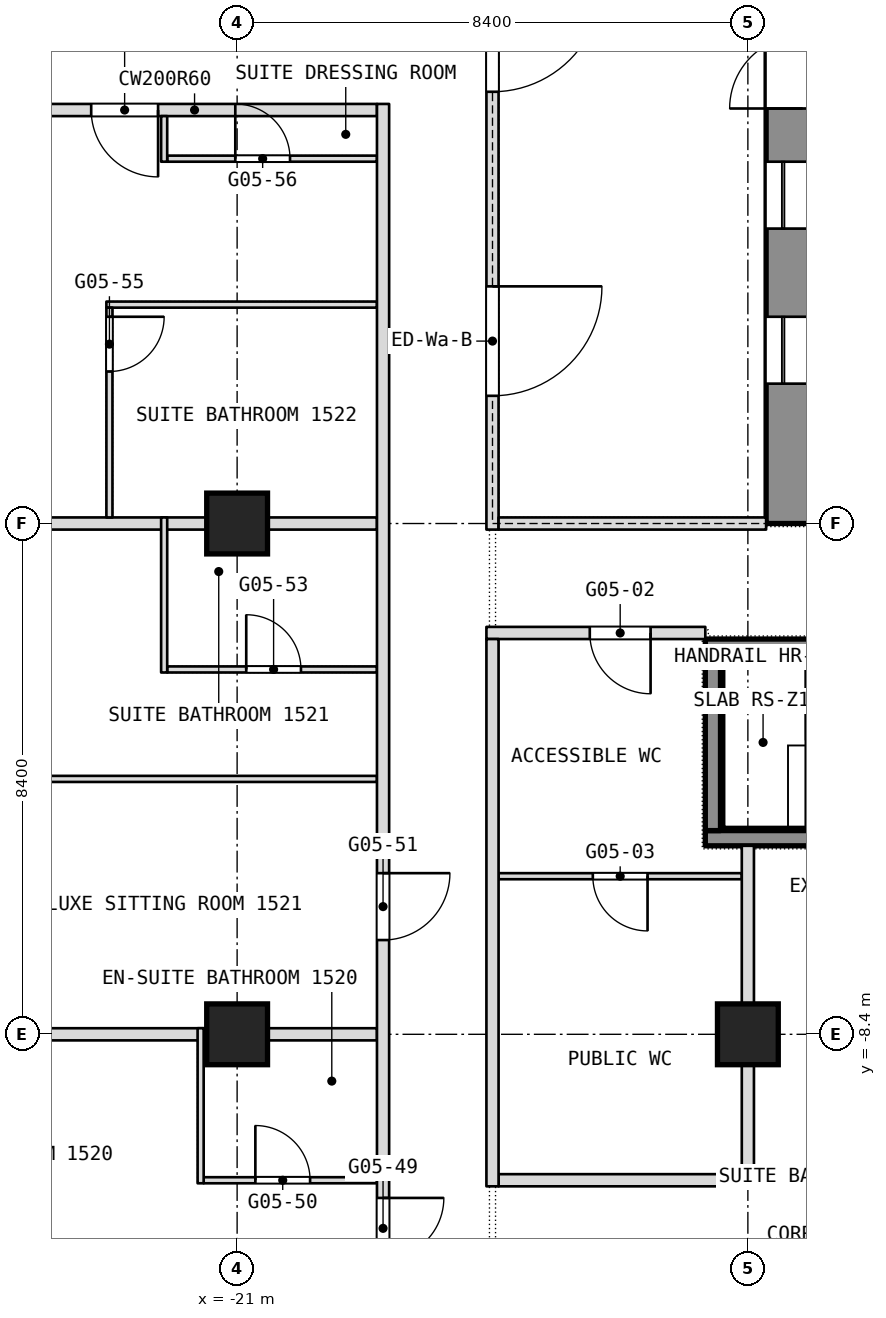
"""IFC4 building model, lengths in metres.
Left out: names, types, materials, properties, quantities, classifications, styles, units other than length and angle.
Written with IfcOpenShell. Run it as: python <this file> out.ifc"""

import sys

from ifc_helpers import new_model, si_unit, direction, frame, frame_2d, origin, origin_2d, place, context, subcontext, project, spatial, rectangle, extrude, element, fill, save


model = new_model("IFC4")
c1 = context("Model", 3, precision=1e-05, world=origin(), true_north=direction((0.0, 1.0)))
c2 = subcontext(c1, "Body", "Model", "MODEL_VIEW")
j1 = project(units=[si_unit("LENGTHUNIT", "METRE"), si_unit("PLANEANGLEUNIT", "RADIAN")], contexts=[c1])
p1 = place(None, origin())
s1 = spatial("IfcSite", under=j1, at=p1, CompositionType="ELEMENT")
p2 = place(p1, origin())
s2 = spatial("IfcBuilding", under=s1, at=p2, CompositionType="ELEMENT")
p3 = place(p2, frame((0.0, 0.0, 68.9)))
s3 = spatial("IfcBuildingStorey", under=s2, at=p3, CompositionType="ELEMENT", Elevation=68.9)
p4 = place(p3, frame((-11.7, 0.0, 0.0), z_axis=(0.0, 0.0, 1.0), x_axis=(0.0, 1.0, 0.0)))
e1 = element("IfcWall", 1, at=p4, inside=s3, PredefinedType="SHEAR", context=c2, shape_type="SweptSolid", body=[
    extrude(rectangle(XDim=16.8, YDim=1.2, at=frame_2d((8.4, 0.0))), origin(), (0.0, 0.0, 1.0), 3.6),
])
p5 = place(p4, frame((2.3, 0.0, 0.0)))
e2 = element("IfcOpeningElement", 2, at=p5, cuts=e1, PredefinedType="OPENING", context=c2, shape_type="SweptSolid", body=[
    extrude(rectangle(XDim=1.1, YDim=2.1, at=frame_2d((0.55, 1.05))), frame((0.0, 0.6, 0.0), z_axis=(0.0, -1.0, 0.0), x_axis=(1.0, 0.0, 0.0)), (0.0, 0.0, 1.0), 1.2),
])
p6 = place(p4, frame((4.85, 0.0, 0.0)))
e3 = element("IfcOpeningElement", 3, at=p6, cuts=e1, PredefinedType="OPENING", context=c2, shape_type="SweptSolid", body=[
    extrude(rectangle(XDim=1.1, YDim=2.1, at=frame_2d((0.55, 1.05))), frame((0.0, 0.6, 0.0), z_axis=(0.0, -1.0, 0.0), x_axis=(1.0, 0.0, 0.0)), (0.0, 0.0, 1.0), 1.2),
])
p7 = place(p4, frame((6.825, 0.0, 0.0)))
e4 = element("IfcOpeningElement", 4, at=p7, cuts=e1, PredefinedType="OPENING", context=c2, shape_type="SweptSolid", body=[
    extrude(rectangle(XDim=1.2, YDim=2.1, at=frame_2d((0.6, 1.05))), frame((0.0, 0.6, 0.0), z_axis=(0.0, -1.0, 0.0), x_axis=(1.0, 0.0, 0.0)), (0.0, 0.0, 1.0), 1.2),
])
p8 = place(p4, frame((13.4, 0.0, 0.0)))
e5 = element("IfcOpeningElement", 5, at=p8, cuts=e1, PredefinedType="OPENING", context=c2, shape_type="SweptSolid", body=[
    extrude(rectangle(XDim=1.1, YDim=2.1, at=frame_2d((0.55, 1.05))), frame((0.0, 0.6, 0.0), z_axis=(0.0, -1.0, 0.0), x_axis=(1.0, 0.0, 0.0)), (0.0, 0.0, 1.0), 1.2),
])
p9 = place(p4, frame((10.85, 0.0, 0.0)))
e6 = element("IfcOpeningElement", 6, at=p9, cuts=e1, PredefinedType="OPENING", context=c2, shape_type="SweptSolid", body=[
    extrude(rectangle(XDim=1.1, YDim=2.1, at=frame_2d((0.55, 1.05))), frame((0.0, 0.6, 0.0), z_axis=(0.0, -1.0, 0.0), x_axis=(1.0, 0.0, 0.0)), (0.0, 0.0, 1.0), 1.2),
])
p10 = place(p4, frame((8.775, 0.0, 0.0)))
e7 = element("IfcOpeningElement", 7, at=p10, cuts=e1, PredefinedType="OPENING", context=c2, shape_type="SweptSolid", body=[
    extrude(rectangle(XDim=1.2, YDim=2.1, at=frame_2d((0.6, 1.05))), frame((0.0, 0.6, 0.0), z_axis=(0.0, -1.0, 0.0), x_axis=(1.0, 0.0, 0.0)), (0.0, 0.0, 1.0), 1.2),
])
for number, where, z_axis, x_axis in (
    (8, (-21.0, -8.4, 0.0), (0.0, 0.0, 1.0), (1.0, 0.0, 0.0)),
    (9, (-21.0, 0.0, 0.0), (0.0, 0.0, 1.0), (1.0, 0.0, 0.0)),
    (10, (-12.6, -8.4, 0.0), (0.0, 0.0, 1.0), (1.0, 0.0, 0.0)),
):
    element("IfcColumn", number, at=place(p3, frame(where, z_axis=z_axis, x_axis=x_axis)), inside=s3, PredefinedType="COLUMN", context=c2, shape_type="SweptSolid", body=[
        extrude(rectangle(XDim=1.0, YDim=1.0, at=origin_2d()), origin(), (0.0, 0.0, 1.0), 3.6),
    ])
p11 = place(p3, frame((-21.55, -10.8, 0.0), z_axis=(0.0, 0.0, 1.0), x_axis=(1.0, 0.0, 0.0)))
e11 = element("IfcWall", 11, at=p11, inside=s3, PredefinedType="PARTITIONING", context=c2, shape_type="SweptSolid", body=[
    extrude(rectangle(XDim=2.85, YDim=0.1, at=frame_2d((1.425, 0.0))), origin(), (0.0, 0.0, 1.0), 3.34),
])
p12 = place(p11, frame((0.85, 0.0, 0.0)))
e12 = element("IfcOpeningElement", 12, at=p12, cuts=e11, PredefinedType="OPENING", context=c2, shape_type="SweptSolid", body=[
    extrude(rectangle(XDim=0.9, YDim=2.1, at=frame_2d((0.45, 1.05))), frame((0.0, 0.05, 0.0), z_axis=(0.0, -1.0, 0.0), x_axis=(1.0, 0.0, 0.0)), (0.0, 0.0, 1.0), 0.1),
])
p13 = place(p3, frame((-16.7, -10.8, 0.0), z_axis=(0.0, 0.0, 1.0), x_axis=(1.0, 0.0, 0.0)))
e13 = element("IfcWall", 13, at=p13, inside=s3, PredefinedType="PARTITIONING", context=c2, shape_type="SweptSolid", body=[
    extrude(rectangle(XDim=4.0, YDim=0.2, at=frame_2d((2.0, 0.0))), origin(), (0.0, 0.0, 1.0), 3.34),
])
p14 = place(p3, frame((-29.7, -8.4, 0.0), z_axis=(0.0, 0.0, 1.0), x_axis=(1.0, 0.0, 0.0)))
e14 = element("IfcWall", 14, at=p14, inside=s3, PredefinedType="PARTITIONING", context=c2, shape_type="SweptSolid", body=[
    extrude(rectangle(XDim=11.0, YDim=0.2, at=frame_2d((5.5, 0.0))), origin(), (0.0, 0.0, 1.0), 2.84),
])
p15 = place(p3, frame((-16.7, -5.8, 0.0), z_axis=(0.0, 0.0, 1.0), x_axis=(1.0, 0.0, 0.0)))
e15 = element("IfcWall", 15, at=p15, inside=s3, PredefinedType="PARTITIONING", context=c2, shape_type="SweptSolid", body=[
    extrude(rectangle(XDim=4.0, YDim=0.1, at=frame_2d((2.0, 0.0))), origin(), (0.0, 0.0, 1.0), 3.34),
])
p16 = place(p15, frame((1.55, 0.0, 0.0)))
e16 = element("IfcOpeningElement", 16, at=p16, cuts=e15, PredefinedType="OPENING", context=c2, shape_type="SweptSolid", body=[
    extrude(rectangle(XDim=0.9, YDim=2.1, at=frame_2d((0.45, 1.05))), frame((0.0, 0.05, 0.0), z_axis=(0.0, -1.0, 0.0), x_axis=(1.0, 0.0, 0.0)), (0.0, 0.0, 1.0), 0.1),
])
p17 = place(p3, frame((-29.7, -4.2, 0.0), z_axis=(0.0, 0.0, 1.0), x_axis=(1.0, 0.0, 0.0)))
e17 = element("IfcWall", 17, at=p17, inside=s3, PredefinedType="PARTITIONING", context=c2, shape_type="SweptSolid", body=[
    extrude(rectangle(XDim=11.0, YDim=0.1, at=frame_2d((5.5, 0.0))), origin(), (0.0, 0.0, 1.0), 3.34),
])
p18 = place(p17, frame((4.17, 0.0, 0.0)))
e18 = element("IfcOpeningElement", 18, at=p18, cuts=e17, PredefinedType="OPENING", context=c2, shape_type="SweptSolid", body=[
    extrude(rectangle(XDim=0.9, YDim=2.1, at=frame_2d((0.45, 1.05))), frame((0.0, 0.05, 0.0), z_axis=(0.0, -1.0, 0.0), x_axis=(1.0, 0.0, 0.0)), (0.0, 0.0, 1.0), 0.1),
])
p19 = place(p3, frame((-22.15, -2.4, 0.0), z_axis=(0.0, 0.0, 1.0), x_axis=(1.0, 0.0, 0.0)))
e19 = element("IfcWall", 19, at=p19, inside=s3, PredefinedType="PARTITIONING", context=c2, shape_type="SweptSolid", body=[
    extrude(rectangle(XDim=3.45, YDim=0.1, at=frame_2d((1.725, 0.0))), origin(), (0.0, 0.0, 1.0), 3.34),
])
p20 = place(p19, frame((1.3, 0.0, 0.0)))
e20 = element("IfcOpeningElement", 20, at=p20, cuts=e19, PredefinedType="OPENING", context=c2, shape_type="SweptSolid", body=[
    extrude(rectangle(XDim=0.9, YDim=2.1, at=frame_2d((0.45, 1.05))), frame((0.0, 0.05, 0.0), z_axis=(0.0, -1.0, 0.0), x_axis=(1.0, 0.0, 0.0)), (0.0, 0.0, 1.0), 0.1),
])
p21 = place(p3, frame((-16.9, -1.8, 0.0), z_axis=(0.0, 0.0, 1.0), x_axis=(1.0, 0.0, 0.0)))
e21 = element("IfcWall", 21, at=p21, inside=s3, PredefinedType="PARTITIONING", context=c2, shape_type="SweptSolid", body=[
    extrude(rectangle(XDim=3.6, YDim=0.2, at=frame_2d((1.8, 0.0))), origin(), (0.0, 0.0, 1.0), 3.34),
])
p22 = place(p21, frame((1.7, 0.0, 0.0)))
e22 = element("IfcOpeningElement", 22, at=p22, cuts=e21, PredefinedType="OPENING", context=c2, shape_type="SweptSolid", body=[
    extrude(rectangle(XDim=1.0, YDim=2.1, at=frame_2d((0.5, 1.05))), frame((0.0, 0.1, 0.0), z_axis=(0.0, -1.0, 0.0), x_axis=(1.0, 0.0, 0.0)), (0.0, 0.0, 1.0), 0.2),
])
p23 = place(p3, frame((-29.7, 0.0, 0.0), z_axis=(0.0, 0.0, 1.0), x_axis=(1.0, 0.0, 0.0)))
e23 = element("IfcWall", 23, at=p23, inside=s3, PredefinedType="PARTITIONING", context=c2, shape_type="SweptSolid", body=[
    extrude(rectangle(XDim=11.0, YDim=0.2, at=frame_2d((5.5, 0.0))), origin(), (0.0, 0.0, 1.0), 2.84),
])
p24 = place(p3, frame((-23.15, 3.6, 0.0), z_axis=(0.0, 0.0, 1.0), x_axis=(1.0, 0.0, 0.0)))
e24 = element("IfcWall", 24, at=p24, inside=s3, PredefinedType="PARTITIONING", context=c2, shape_type="SweptSolid", body=[
    extrude(rectangle(XDim=4.45, YDim=0.1, at=frame_2d((2.225, 0.0))), origin(), (0.0, 0.0, 1.0), 3.34),
])
p25 = place(p3, frame((-22.15, 6.0, 0.0), z_axis=(0.0, 0.0, 1.0), x_axis=(1.0, 0.0, 0.0)))
e25 = element("IfcWall", 25, at=p25, inside=s3, PredefinedType="PARTITIONING", context=c2, shape_type="SweptSolid", body=[
    extrude(rectangle(XDim=3.45, YDim=0.1, at=frame_2d((1.725, 0.0))), origin(), (0.0, 0.0, 1.0), 3.34),
])
p26 = place(p25, frame((1.12, 0.0, 0.0)))
e26 = element("IfcOpeningElement", 26, at=p26, cuts=e25, PredefinedType="OPENING", context=c2, shape_type="SweptSolid", body=[
    extrude(rectangle(XDim=0.9, YDim=2.1, at=frame_2d((0.45, 1.05))), frame((0.0, 0.05, 0.0), z_axis=(0.0, -1.0, 0.0), x_axis=(1.0, 0.0, 0.0)), (0.0, 0.0, 1.0), 0.1),
])
p27 = place(p3, frame((-24.7, 6.8, 0.0), z_axis=(0.0, 0.0, 1.0), x_axis=(1.0, 0.0, 0.0)))
e27 = element("IfcWall", 27, at=p27, inside=s3, PredefinedType="PARTITIONING", context=c2, shape_type="SweptSolid", body=[
    extrude(rectangle(XDim=6.0, YDim=0.2, at=frame_2d((3.0, 0.0))), origin(), (0.0, 0.0, 1.0), 3.34),
])
p28 = place(p27, frame((1.3, 0.0, 0.0)))
e28 = element("IfcOpeningElement", 28, at=p28, cuts=e27, PredefinedType="OPENING", context=c2, shape_type="SweptSolid", body=[
    extrude(rectangle(XDim=1.1, YDim=2.1, at=frame_2d((0.55, 1.05))), frame((0.0, 0.1, 0.0), z_axis=(0.0, -1.0, 0.0), x_axis=(1.0, 0.0, 0.0)), (0.0, 0.0, 1.0), 0.2),
])
p29 = place(p3, frame((-12.6, -10.9, 0.0), z_axis=(0.0, 0.0, 1.0), x_axis=(0.0, 1.0, 0.0)))
e29 = element("IfcWall", 29, at=p29, inside=s3, PredefinedType="PARTITIONING", context=c2, shape_type="SweptSolid", body=[
    extrude(rectangle(XDim=5.6, YDim=0.2, at=frame_2d((2.8, 0.0))), origin(), (0.0, 0.0, 1.0), 3.34),
])
p30 = place(p3, frame((-16.8, -10.9, 0.0), z_axis=(0.0, 0.0, 1.0), x_axis=(0.0, 1.0, 0.0)))
e30 = element("IfcWall", 30, at=p30, inside=s3, PredefinedType="PARTITIONING", context=c2, shape_type="SweptSolid", body=[
    extrude(rectangle(XDim=9.0, YDim=0.2, at=frame_2d((4.5, 0.0))), origin(), (0.0, 0.0, 1.0), 3.34),
])
p31 = place(p3, frame((-18.6, -16.665, 0.0), z_axis=(0.0, 0.0, 1.0), x_axis=(0.0, 1.0, 0.0)))
e31 = element("IfcWall", 31, at=p31, inside=s3, PredefinedType="PARTITIONING", context=c2, shape_type="SweptSolid", body=[
    extrude(rectangle(XDim=23.565, YDim=0.2, at=frame_2d((11.782, 0.0))), origin(), (0.0, 0.0, 1.0), 3.34),
])
p32 = place(p31, frame((2.991, 0.0, 0.0)))
e32 = element("IfcOpeningElement", 32, at=p32, cuts=e31, PredefinedType="OPENING", context=c2, shape_type="SweptSolid", body=[
    extrude(rectangle(XDim=1.0, YDim=2.1, at=frame_2d((0.5, 1.05))), frame((0.0, 0.1, 0.0), z_axis=(0.0, -1.0, 0.0), x_axis=(1.0, 0.0, 0.0)), (0.0, 0.0, 1.0), 0.2),
])
p33 = place(p31, frame((4.574, 0.0, 0.0)))
e33 = element("IfcOpeningElement", 33, at=p33, cuts=e31, PredefinedType="OPENING", context=c2, shape_type="SweptSolid", body=[
    extrude(rectangle(XDim=1.0, YDim=2.1, at=frame_2d((0.5, 1.05))), frame((0.0, 0.1, 0.0), z_axis=(0.0, -1.0, 0.0), x_axis=(1.0, 0.0, 0.0)), (0.0, 0.0, 1.0), 0.2),
])
p34 = place(p31, frame((9.815, 0.0, 0.0)))
e34 = element("IfcOpeningElement", 34, at=p34, cuts=e31, PredefinedType="OPENING", context=c2, shape_type="SweptSolid", body=[
    extrude(rectangle(XDim=1.1, YDim=2.1, at=frame_2d((0.55, 1.05))), frame((0.0, 0.1, 0.0), z_axis=(0.0, -1.0, 0.0), x_axis=(1.0, 0.0, 0.0)), (0.0, 0.0, 1.0), 0.2),
])
for number, where, z_axis, x_axis in (
    (35, (-21.6, -10.85, 0.0), (0.0, 0.0, 1.0), (0.0, 1.0, 0.0)),
    (36, (-22.2, -2.45, 0.0), (0.0, 0.0, 1.0), (0.0, 1.0, 0.0)),
):
    element("IfcWall", number, at=place(p3, frame(where, z_axis=z_axis, x_axis=x_axis)), inside=s3, PredefinedType="PARTITIONING", context=c2, shape_type="SweptSolid", body=[
        extrude(rectangle(XDim=2.55, YDim=0.1, at=frame_2d((1.275, 0.0))), origin(), (0.0, 0.0, 1.0), 3.34),
    ])
p35 = place(p3, frame((-22.2, 5.95, 0.0), z_axis=(0.0, 0.0, 1.0), x_axis=(0.0, 1.0, 0.0)))
e37 = element("IfcWall", 37, at=p35, inside=s3, PredefinedType="PARTITIONING", context=c2, shape_type="SweptSolid", body=[
    extrude(rectangle(XDim=0.75, YDim=0.1, at=frame_2d((0.375, 0.0))), origin(), (0.0, 0.0, 1.0), 3.34),
])
p36 = place(p3, frame((-23.1, 0.1, 0.0), z_axis=(0.0, 0.0, 1.0), x_axis=(0.0, 1.0, 0.0)))
e38 = element("IfcWall", 38, at=p36, inside=s3, PredefinedType="PARTITIONING", context=c2, shape_type="SweptSolid", body=[
    extrude(rectangle(XDim=3.45, YDim=0.1, at=frame_2d((1.725, 0.0))), origin(), (0.0, 0.0, 1.0), 3.34),
])
p37 = place(p36, frame((2.4, 0.0, 0.0)))
e39 = element("IfcOpeningElement", 39, at=p37, cuts=e38, PredefinedType="OPENING", context=c2, shape_type="SweptSolid", body=[
    extrude(rectangle(XDim=0.9, YDim=2.1, at=frame_2d((0.45, 1.05))), frame((0.0, 0.05, 0.0), z_axis=(0.0, -1.0, 0.0), x_axis=(1.0, 0.0, 0.0)), (0.0, 0.0, 1.0), 0.1),
])
p38 = place(p3, frame((-16.8, -0.1, 0.0), z_axis=(0.0, 0.0, 1.0), x_axis=(0.0, 1.0, 0.0)))
e40 = element("IfcWall", 40, at=p38, inside=s3, PredefinedType="PARTITIONING", context=c2, shape_type="SweptSolid", body=[
    extrude(rectangle(XDim=17.0, YDim=0.2, at=frame_2d((8.5, 0.0))), origin(), (0.0, 0.0, 1.0), 3.34),
])
p39 = place(p38, frame((2.2, 0.0, 0.0)))
e41 = element("IfcOpeningElement", 41, at=p39, cuts=e40, PredefinedType="OPENING", context=c2, shape_type="SweptSolid", body=[
    extrude(rectangle(XDim=1.8, YDim=2.1, at=frame_2d((0.9, 1.05))), frame((0.0, 0.1, 0.0), z_axis=(0.0, -1.0, 0.0), x_axis=(1.0, 0.0, 0.0)), (0.0, 0.0, 1.0), 0.2),
])
p40 = place(p38, frame((7.2, 0.0, 0.0)))
e42 = element("IfcOpeningElement", 42, at=p40, cuts=e40, PredefinedType="OPENING", context=c2, shape_type="SweptSolid", body=[
    extrude(rectangle(XDim=1.8, YDim=2.1, at=frame_2d((0.9, 1.05))), frame((0.0, 0.1, 0.0), z_axis=(0.0, -1.0, 0.0), x_axis=(1.0, 0.0, 0.0)), (0.0, 0.0, 1.0), 0.2),
])
p41 = place(p3, frame((-16.7, 0.0, 0.0), z_axis=(0.0, 0.0, 1.0), x_axis=(1.0, 0.0, 0.0)))
e43 = element("IfcWall", 43, at=p41, inside=s3, PredefinedType="PARTITIONING", context=c2, shape_type="SweptSolid", body=[
    extrude(rectangle(XDim=4.4, YDim=0.2, at=frame_2d((2.2, 0.0))), origin(), (0.0, 0.0, 1.0), 2.84),
])
for number, where, z_axis, x_axis in (
    (44, (-13.3, -5.175, 0.1), (0.0, 0.0, 1.0), (1.0, 0.0, 0.0)),
    (45, (-13.3, -2.025, 0.1), (0.0, 0.0, 1.0), (1.0, 0.0, 0.0)),
):
    element("IfcWall", number, at=place(p3, frame(where, z_axis=z_axis, x_axis=x_axis)), inside=s3, PredefinedType="SHEAR", context=c2, shape_type="SweptSolid", body=[
        extrude(rectangle(XDim=6.2, YDim=0.25, at=frame_2d((3.1, 0.0))), origin(), (0.0, 0.0, 1.0), 3.6),
    ])
p42 = place(p3, frame((-13.175, -5.05, 0.1), z_axis=(0.0, 0.0, 1.0), x_axis=(0.0, 1.0, 0.0)))
e46 = element("IfcWall", 46, at=p42, inside=s3, PredefinedType="SHEAR", context=c2, shape_type="SweptSolid", body=[
    extrude(rectangle(XDim=2.9, YDim=0.25, at=frame_2d((1.45, 0.0))), origin(), (0.0, 0.0, 1.0), 3.6),
])
p43 = place(p12, origin())
e47 = element("IfcDoor", 47, at=p43, inside=s3, OperationType="SINGLE_SWING_LEFT", PredefinedType="DOOR", context=c2, shape_type="SweptSolid", body=[
    extrude(rectangle(XDim=0.9, YDim=2.1, at=frame_2d((0.45, 1.05))), frame((0.0, 0.025, 0.0), z_axis=(0.0, -1.0, 0.0), x_axis=(1.0, 0.0, 0.0)), (0.0, 0.0, 1.0), 0.05),
])
fill(e12, e47)
p44 = place(p16, origin())
e48 = element("IfcDoor", 48, at=p44, inside=s3, OperationType="SINGLE_SWING_LEFT", PredefinedType="DOOR", context=c2, shape_type="SweptSolid", body=[
    extrude(rectangle(XDim=0.9, YDim=2.1, at=frame_2d((0.45, 1.05))), frame((0.0, 0.025, 0.0), z_axis=(0.0, -1.0, 0.0), x_axis=(1.0, 0.0, 0.0)), (0.0, 0.0, 1.0), 0.05),
])
fill(e16, e48)
p45 = place(p20, origin())
e49 = element("IfcDoor", 49, at=p45, inside=s3, OperationType="SINGLE_SWING_RIGHT", PredefinedType="DOOR", context=c2, shape_type="SweptSolid", body=[
    extrude(rectangle(XDim=0.9, YDim=2.1, at=frame_2d((0.45, 1.05))), frame((0.0, 0.025, 0.0), z_axis=(0.0, -1.0, 0.0), x_axis=(1.0, 0.0, 0.0)), (0.0, 0.0, 1.0), 0.05),
])
fill(e20, e49)
p46 = place(p22, origin())
e50 = element("IfcDoor", 50, at=p46, inside=s3, OperationType="SINGLE_SWING_RIGHT", PredefinedType="DOOR", context=c2, shape_type="SweptSolid", body=[
    extrude(rectangle(XDim=1.0, YDim=2.1, at=frame_2d((0.5, 1.05))), frame((0.0, 0.025, 0.0), z_axis=(0.0, -1.0, 0.0), x_axis=(1.0, 0.0, 0.0)), (0.0, 0.0, 1.0), 0.05),
])
fill(e22, e50)
p47 = place(p26, origin())
e51 = element("IfcDoor", 51, at=p47, inside=s3, OperationType="SINGLE_SWING_LEFT", PredefinedType="DOOR", context=c2, shape_type="SweptSolid", body=[
    extrude(rectangle(XDim=0.9, YDim=2.1, at=frame_2d((0.45, 1.05))), frame((0.0, 0.025, 0.0), z_axis=(0.0, -1.0, 0.0), x_axis=(1.0, 0.0, 0.0)), (0.0, 0.0, 1.0), 0.05),
])
fill(e26, e51)
p48 = place(p28, origin())
e52 = element("IfcDoor", 52, at=p48, inside=s3, OperationType="SINGLE_SWING_LEFT", PredefinedType="DOOR", context=c2, shape_type="SweptSolid", body=[
    extrude(rectangle(XDim=1.1, YDim=2.1, at=frame_2d((0.55, 1.05))), frame((0.0, 0.025, 0.0), z_axis=(0.0, -1.0, 0.0), x_axis=(1.0, 0.0, 0.0)), (0.0, 0.0, 1.0), 0.05),
])
fill(e28, e52)
p49 = place(p33, origin())
e53 = element("IfcDoor", 53, at=p49, inside=s3, OperationType="SINGLE_SWING_RIGHT", PredefinedType="DOOR", context=c2, shape_type="SweptSolid", body=[
    extrude(rectangle(XDim=1.0, YDim=2.1, at=frame_2d((0.5, 1.05))), frame((0.0, 0.025, 0.0), z_axis=(0.0, -1.0, 0.0), x_axis=(1.0, 0.0, 0.0)), (0.0, 0.0, 1.0), 0.05),
])
fill(e33, e53)
p50 = place(p34, origin())
e54 = element("IfcDoor", 54, at=p50, inside=s3, OperationType="SINGLE_SWING_RIGHT", PredefinedType="DOOR", context=c2, shape_type="SweptSolid", body=[
    extrude(rectangle(XDim=1.1, YDim=2.1, at=frame_2d((0.55, 1.05))), frame((0.0, 0.025, 0.0), z_axis=(0.0, -1.0, 0.0), x_axis=(1.0, 0.0, 0.0)), (0.0, 0.0, 1.0), 0.05),
])
fill(e34, e54)
p51 = place(p37, origin())
e55 = element("IfcDoor", 55, at=p51, inside=s3, OperationType="SINGLE_SWING_LEFT", PredefinedType="DOOR", context=c2, shape_type="SweptSolid", body=[
    extrude(rectangle(XDim=0.9, YDim=2.1, at=frame_2d((0.45, 1.05))), frame((0.0, 0.025, 0.0), z_axis=(0.0, -1.0, 0.0), x_axis=(1.0, 0.0, 0.0)), (0.0, 0.0, 1.0), 0.05),
])
fill(e39, e55)
p52 = place(p5, origin())
e56 = element("IfcDoor", 56, at=p52, inside=s3, OperationType="SLIDING_TO_LEFT", PredefinedType="DOOR", context=c2, shape_type="SweptSolid", body=[
    extrude(rectangle(XDim=1.1, YDim=2.1, at=frame_2d((0.55, 1.05))), frame((0.0, 0.025, 0.0), z_axis=(0.0, -1.0, 0.0), x_axis=(1.0, 0.0, 0.0)), (0.0, 0.0, 1.0), 0.05),
])
fill(e2, e56)
p53 = place(p6, origin())
e57 = element("IfcDoor", 57, at=p53, inside=s3, OperationType="SLIDING_TO_LEFT", PredefinedType="DOOR", context=c2, shape_type="SweptSolid", body=[
    extrude(rectangle(XDim=1.1, YDim=2.1, at=frame_2d((0.55, 1.05))), frame((0.0, 0.025, 0.0), z_axis=(0.0, -1.0, 0.0), x_axis=(1.0, 0.0, 0.0)), (0.0, 0.0, 1.0), 0.05),
])
fill(e3, e57)
p54 = place(p7, origin())
e58 = element("IfcDoor", 58, at=p54, inside=s3, OperationType="SINGLE_SWING_LEFT", PredefinedType="DOOR", context=c2, shape_type="SweptSolid", body=[
    extrude(rectangle(XDim=1.2, YDim=2.1, at=frame_2d((0.6, 1.05))), frame((0.0, 0.025, 0.0), z_axis=(0.0, -1.0, 0.0), x_axis=(1.0, 0.0, 0.0)), (0.0, 0.0, 1.0), 0.05),
])
fill(e4, e58)
p55 = place(p39, origin())
e59 = element("IfcDoor", 59, at=p55, inside=s3, OperationType="DOUBLE_DOOR_SINGLE_SWING", PredefinedType="DOOR", context=c2, shape_type="SweptSolid", body=[
    extrude(rectangle(XDim=1.8, YDim=2.1, at=frame_2d((0.9, 1.05))), frame((0.0, 0.025, 0.0), z_axis=(0.0, -1.0, 0.0), x_axis=(1.0, 0.0, 0.0)), (0.0, 0.0, 1.0), 0.05),
])
fill(e41, e59)
p56 = place(p40, origin())
e60 = element("IfcDoor", 60, at=p56, inside=s3, OperationType="DOUBLE_DOOR_SINGLE_SWING", PredefinedType="DOOR", context=c2, shape_type="SweptSolid", body=[
    extrude(rectangle(XDim=1.8, YDim=2.1, at=frame_2d((0.9, 1.05))), frame((0.0, 0.025, 0.0), z_axis=(0.0, -1.0, 0.0), x_axis=(1.0, 0.0, 0.0)), (0.0, 0.0, 1.0), 0.05),
])
fill(e42, e60)
save(model, sys.argv[1])
